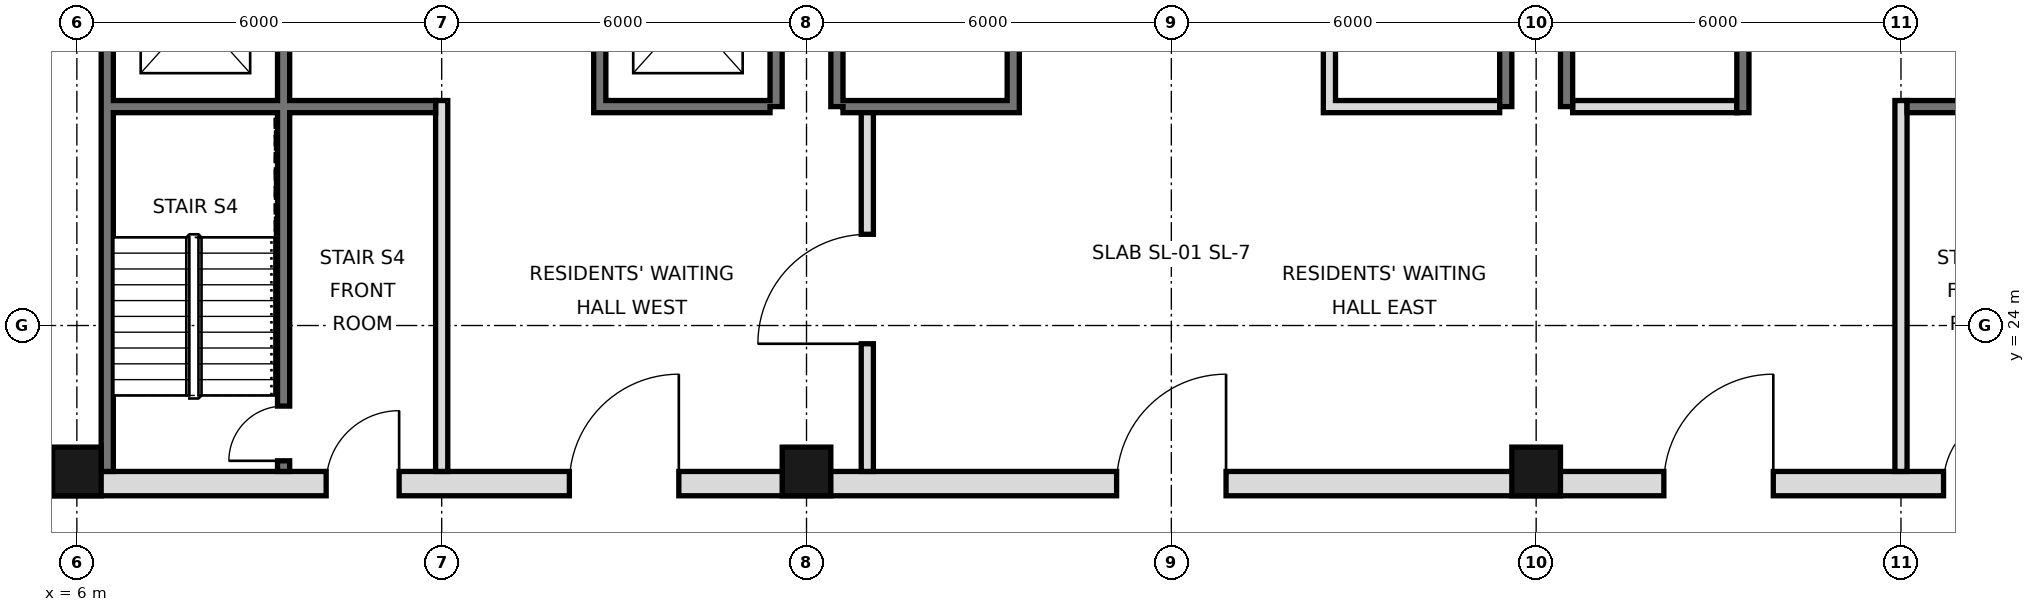
"""IFC4 building model, lengths in metres.
Left out: names, types, materials, properties, quantities, classifications, styles, units other than length and angle.
Written with IfcOpenShell. Run it as: python <this file> out.ifc"""

import sys

from ifc_helpers import new_model, si_unit, direction, frame, frame_2d, origin, origin_2d, place, context, subcontext, project, spatial, rectangle, hollow_rectangle, extrude, element, fill, save


model = new_model("IFC4")
c1 = context("Model", 3, precision=1e-05, world=origin(), true_north=direction((0.0, 1.0)))
c2 = subcontext(c1, "Body", "Model", "MODEL_VIEW")
j1 = project(units=[si_unit("LENGTHUNIT", "METRE"), si_unit("PLANEANGLEUNIT", "RADIAN")], contexts=[c1])
p1 = place(None, origin())
s1 = spatial("IfcSite", under=j1, at=p1, CompositionType="ELEMENT")
p2 = place(p1, origin())
s2 = spatial("IfcBuilding", under=s1, at=p2, CompositionType="ELEMENT")
p3 = place(p2, frame((0.0, 0.0, 143.8)))
s3 = spatial("IfcBuildingStorey", under=s2, at=p3, CompositionType="ELEMENT", Elevation=143.8)
for number, where, z_axis, x_axis in (
    (1, (6.0, 21.6, 0.0), (0.0, 0.0, 1.0), (1.0, 0.0, 0.0)),
    (2, (18.0, 21.6, 0.0), (0.0, 0.0, 1.0), (1.0, 0.0, 0.0)),
    (3, (30.0, 21.6, 0.0), (0.0, 0.0, 1.0), (1.0, 0.0, 0.0)),
):
    element("IfcColumn", number, at=place(p3, frame(where, z_axis=z_axis, x_axis=x_axis)), inside=s3, PredefinedType="COLUMN", context=c2, shape_type="SweptSolid", body=[
        extrude(hollow_rectangle(XDim=0.8, YDim=0.8, WallThickness=0.05, at=origin_2d()), origin(), (0.0, 0.0, 1.0), 3.6),
    ])
p4 = place(p3, frame((6.5, 21.6, 0.0), z_axis=(0.0, 0.0, 1.0), x_axis=(0.0, 1.0, 0.0)))
e4 = element("IfcWall", 4, at=p4, inside=s3, PredefinedType="SOLIDWALL", context=c2, shape_type="SweptSolid", body=[
    extrude(rectangle(XDim=23.5, YDim=0.2, at=frame_2d((11.75, 0.0))), origin(), (0.0, 0.0, 1.0), 3.42),
])
for number, where, z_axis, x_axis in (
    (5, (17.5, 27.6, 0.0), (0.0, 0.0, 1.0), (0.0, 1.0, 0.0)),
    (6, (18.5, 27.6, 0.0), (0.0, 0.0, 1.0), (0.0, 1.0, 0.0)),
    (7, (29.5, 27.6, 0.0), (0.0, 0.0, 1.0), (0.0, 1.0, 0.0)),
    (8, (30.5, 27.6, 0.0), (0.0, 0.0, 1.0), (0.0, 1.0, 0.0)),
):
    element("IfcWall", number, at=place(p3, frame(where, z_axis=z_axis, x_axis=x_axis)), inside=s3, PredefinedType="SOLIDWALL", context=c2, shape_type="SweptSolid", body=[
        extrude(rectangle(XDim=17.5, YDim=0.2, at=frame_2d((8.75, 0.0))), origin(), (0.0, 0.0, 1.0), 3.42),
    ])
p5 = place(p3, frame((5.6, 21.4, 0.0), z_axis=(0.0, 0.0, 1.0), x_axis=(1.0, 0.0, 0.0)))
e9 = element("IfcWall", 9, at=p5, inside=s3, PredefinedType="SOLIDWALL", context=c2, shape_type="SweptSolid", body=[
    extrude(rectangle(XDim=36.8, YDim=0.4, at=frame_2d((18.4, 0.0))), origin(), (0.0, 0.0, 1.0), 3.42),
])
p6 = place(p5, frame((8.5, 0.0, 0.0)))
e10 = element("IfcOpeningElement", 10, at=p6, cuts=e9, PredefinedType="OPENING", context=c2, shape_type="SweptSolid", body=[
    extrude(rectangle(XDim=1.8, YDim=2.1, at=frame_2d((0.9, 1.05))), frame((0.0, 0.21, 0.0), z_axis=(0.0, -1.0, 0.0), x_axis=(1.0, 0.0, 0.0)), (0.0, 0.0, 1.0), 0.42),
])
p7 = place(p5, frame((17.5, 0.0, 0.0)))
e11 = element("IfcOpeningElement", 11, at=p7, cuts=e9, PredefinedType="OPENING", context=c2, shape_type="SweptSolid", body=[
    extrude(rectangle(XDim=1.8, YDim=2.1, at=frame_2d((0.9, 1.05))), frame((0.0, 0.21, 0.0), z_axis=(0.0, -1.0, 0.0), x_axis=(1.0, 0.0, 0.0)), (0.0, 0.0, 1.0), 0.42),
])
p8 = place(p5, frame((26.5, 0.0, 0.0)))
e12 = element("IfcOpeningElement", 12, at=p8, cuts=e9, PredefinedType="OPENING", context=c2, shape_type="SweptSolid", body=[
    extrude(rectangle(XDim=1.8, YDim=2.1, at=frame_2d((0.9, 1.05))), frame((0.0, 0.21, 0.0), z_axis=(0.0, -1.0, 0.0), x_axis=(1.0, 0.0, 0.0)), (0.0, 0.0, 1.0), 0.42),
])
p9 = place(p5, frame((4.5, 0.0, 0.0)))
e13 = element("IfcOpeningElement", 13, at=p9, cuts=e9, PredefinedType="OPENING", context=c2, shape_type="SweptSolid", body=[
    extrude(rectangle(XDim=1.2, YDim=2.1, at=frame_2d((0.6, 1.05))), frame((0.0, 0.21, 0.0), z_axis=(0.0, -1.0, 0.0), x_axis=(1.0, 0.0, 0.0)), (0.0, 0.0, 1.0), 0.42),
])
p10 = place(p5, frame((31.1, 0.0, 0.0)))
e14 = element("IfcOpeningElement", 14, at=p10, cuts=e9, PredefinedType="OPENING", context=c2, shape_type="SweptSolid", body=[
    extrude(rectangle(XDim=1.2, YDim=2.1, at=frame_2d((0.6, 1.05))), frame((0.0, 0.21, 0.0), z_axis=(0.0, -1.0, 0.0), x_axis=(1.0, 0.0, 0.0)), (0.0, 0.0, 1.0), 0.42),
])
p11 = place(p3, frame((19.0, 21.6, 0.0), z_axis=(0.0, 0.0, 1.0), x_axis=(0.0, 1.0, 0.0)))
e15 = element("IfcWall", 15, at=p11, inside=s3, PredefinedType="PARTITIONING", context=c2, shape_type="SweptSolid", body=[
    extrude(rectangle(XDim=6.0, YDim=0.2, at=frame_2d((3.0, 0.0))), origin(), (0.0, 0.0, 1.0), 3.42),
])
p12 = place(p11, frame((2.1, 0.0, 0.0)))
e16 = element("IfcOpeningElement", 16, at=p12, cuts=e15, PredefinedType="OPENING", context=c2, shape_type="SweptSolid", body=[
    extrude(rectangle(XDim=1.8, YDim=2.1, at=frame_2d((0.9, 1.05))), frame((0.0, 0.11, 0.0), z_axis=(0.0, -1.0, 0.0), x_axis=(1.0, 0.0, 0.0)), (0.0, 0.0, 1.0), 0.22),
])
p13 = place(p3, frame((12.0, 21.6, 0.0), z_axis=(0.0, 0.0, 1.0), x_axis=(0.0, 1.0, 0.0)))
e17 = element("IfcWall", 17, at=p13, inside=s3, PredefinedType="PARTITIONING", context=c2, shape_type="SweptSolid", body=[
    extrude(rectangle(XDim=6.1, YDim=0.2, at=frame_2d((3.05, 0.0))), origin(), (0.0, 0.0, 1.0), 3.42),
])
p14 = place(p3, frame((14.6, 27.5, 0.0), z_axis=(0.0, 0.0, 1.0), x_axis=(0.0, 1.0, 0.0)))
e18 = element("IfcWall", 18, at=p14, inside=s3, PredefinedType="SOLIDWALL", context=c2, shape_type="SweptSolid", body=[
    extrude(rectangle(XDim=17.5, YDim=0.2, at=frame_2d((8.75, 0.0))), origin(), (0.0, 0.0, 1.0), 3.42),
])
p15 = place(p14, frame((1.1, 0.0, 0.0)))
e19 = element("IfcOpeningElement", 19, at=p15, cuts=e18, PredefinedType="OPENING", context=c2, shape_type="SweptSolid", body=[
    extrude(rectangle(XDim=1.1, YDim=2.1, at=frame_2d((0.55, 1.05))), frame((0.0, 0.11, 0.0), z_axis=(0.0, -1.0, 0.0), x_axis=(1.0, 0.0, 0.0)), (0.0, 0.0, 1.0), 0.22),
])
p16 = place(p14, frame((4.2, 0.0, 0.0)))
e20 = element("IfcOpeningElement", 20, at=p16, cuts=e18, PredefinedType="OPENING", context=c2, shape_type="SweptSolid", body=[
    extrude(rectangle(XDim=1.1, YDim=2.1, at=frame_2d((0.55, 1.05))), frame((0.0, 0.11, 0.0), z_axis=(0.0, -1.0, 0.0), x_axis=(1.0, 0.0, 0.0)), (0.0, 0.0, 1.0), 0.22),
])
p17 = place(p14, frame((15.4, 0.0, 0.0)))
e21 = element("IfcOpeningElement", 21, at=p17, cuts=e18, PredefinedType="OPENING", context=c2, shape_type="SweptSolid", body=[
    extrude(rectangle(XDim=1.1, YDim=2.1, at=frame_2d((0.55, 1.05))), frame((0.0, 0.11, 0.0), z_axis=(0.0, -1.0, 0.0), x_axis=(1.0, 0.0, 0.0)), (0.0, 0.0, 1.0), 0.22),
])
p18 = place(p14, frame((9.9, 0.0, 0.0)))
e22 = element("IfcOpeningElement", 22, at=p18, cuts=e18, PredefinedType="OPENING", context=c2, shape_type="SweptSolid", body=[
    extrude(rectangle(XDim=0.9, YDim=2.1, at=frame_2d((0.45, 1.05))), frame((0.0, 0.11, 0.0), z_axis=(0.0, -1.0, 0.0), x_axis=(1.0, 0.0, 0.0)), (0.0, 0.0, 1.0), 0.22),
])
p19 = place(p3, frame((21.4, 27.5, 0.0), z_axis=(0.0, 0.0, 1.0), x_axis=(0.0, 1.0, 0.0)))
e23 = element("IfcWall", 23, at=p19, inside=s3, PredefinedType="SOLIDWALL", context=c2, shape_type="SweptSolid", body=[
    extrude(rectangle(XDim=17.5, YDim=0.2, at=frame_2d((8.75, 0.0))), origin(), (0.0, 0.0, 1.0), 3.42),
])
p20 = place(p19, frame((9.8, 0.0, 0.0)))
e24 = element("IfcOpeningElement", 24, at=p20, cuts=e23, PredefinedType="OPENING", context=c2, shape_type="SweptSolid", body=[
    extrude(rectangle(XDim=1.0, YDim=2.1, at=frame_2d((0.5, 1.05))), frame((0.0, 0.11, 0.0), z_axis=(0.0, -1.0, 0.0), x_axis=(1.0, 0.0, 0.0)), (0.0, 0.0, 1.0), 0.22),
])
p21 = place(p19, frame((7.4, 0.0, 0.0)))
e25 = element("IfcOpeningElement", 25, at=p21, cuts=e23, PredefinedType="OPENING", context=c2, shape_type="SweptSolid", body=[
    extrude(rectangle(XDim=0.9, YDim=2.1, at=frame_2d((0.45, 1.05))), frame((0.0, 0.11, 0.0), z_axis=(0.0, -1.0, 0.0), x_axis=(1.0, 0.0, 0.0)), (0.0, 0.0, 1.0), 0.22),
])
p22 = place(p3, frame((26.6, 27.5, 0.0), z_axis=(0.0, 0.0, 1.0), x_axis=(0.0, 1.0, 0.0)))
e26 = element("IfcWall", 26, at=p22, inside=s3, PredefinedType="SOLIDWALL", context=c2, shape_type="SweptSolid", body=[
    extrude(rectangle(XDim=17.5, YDim=0.2, at=frame_2d((8.75, 0.0))), origin(), (0.0, 0.0, 1.0), 3.42),
])
p23 = place(p22, frame((4.3, 0.0, 0.0)))
e27 = element("IfcOpeningElement", 27, at=p23, cuts=e26, PredefinedType="OPENING", context=c2, shape_type="SweptSolid", body=[
    extrude(rectangle(XDim=0.9, YDim=2.1, at=frame_2d((0.45, 1.05))), frame((0.0, 0.11, 0.0), z_axis=(0.0, -1.0, 0.0), x_axis=(1.0, 0.0, 0.0)), (0.0, 0.0, 1.0), 0.22),
])
p24 = place(p22, frame((10.35, 0.0, 0.0)))
e28 = element("IfcOpeningElement", 28, at=p24, cuts=e26, PredefinedType="OPENING", context=c2, shape_type="SweptSolid", body=[
    extrude(rectangle(XDim=1.0, YDim=2.1, at=frame_2d((0.5, 1.05))), frame((0.0, 0.11, 0.0), z_axis=(0.0, -1.0, 0.0), x_axis=(1.0, 0.0, 0.0)), (0.0, 0.0, 1.0), 0.22),
])
p25 = place(p3, frame((33.4, 27.5, 0.0), z_axis=(0.0, 0.0, 1.0), x_axis=(0.0, 1.0, 0.0)))
e29 = element("IfcWall", 29, at=p25, inside=s3, PredefinedType="SOLIDWALL", context=c2, shape_type="SweptSolid", body=[
    extrude(rectangle(XDim=17.5, YDim=0.2, at=frame_2d((8.75, 0.0))), origin(), (0.0, 0.0, 1.0), 3.42),
])
p26 = place(p25, frame((15.4, 0.0, 0.0)))
e30 = element("IfcOpeningElement", 30, at=p26, cuts=e29, PredefinedType="OPENING", context=c2, shape_type="SweptSolid", body=[
    extrude(rectangle(XDim=1.1, YDim=2.1, at=frame_2d((0.55, 1.05))), frame((0.0, 0.11, 0.0), z_axis=(0.0, -1.0, 0.0), x_axis=(1.0, 0.0, 0.0)), (0.0, 0.0, 1.0), 0.22),
])
p27 = place(p25, frame((2.7, 0.0, 0.0)))
e31 = element("IfcOpeningElement", 31, at=p27, cuts=e29, PredefinedType="OPENING", context=c2, shape_type="SweptSolid", body=[
    extrude(rectangle(XDim=1.0, YDim=2.1, at=frame_2d((0.5, 1.05))), frame((0.0, 0.11, 0.0), z_axis=(0.0, -1.0, 0.0), x_axis=(1.0, 0.0, 0.0)), (0.0, 0.0, 1.0), 0.22),
])
p28 = place(p25, frame((9.9, 0.0, 0.0)))
e32 = element("IfcOpeningElement", 32, at=p28, cuts=e29, PredefinedType="OPENING", context=c2, shape_type="SweptSolid", body=[
    extrude(rectangle(XDim=0.9, YDim=2.1, at=frame_2d((0.45, 1.05))), frame((0.0, 0.11, 0.0), z_axis=(0.0, -1.0, 0.0), x_axis=(1.0, 0.0, 0.0)), (0.0, 0.0, 1.0), 0.22),
])
p29 = place(p3, frame((36.0, 21.6, 0.0), z_axis=(0.0, 0.0, 1.0), x_axis=(0.0, 1.0, 0.0)))
e33 = element("IfcWall", 33, at=p29, inside=s3, PredefinedType="PARTITIONING", context=c2, shape_type="SweptSolid", body=[
    extrude(rectangle(XDim=6.1, YDim=0.2, at=frame_2d((3.05, 0.0))), origin(), (0.0, 0.0, 1.0), 3.42),
])
p30 = place(p3, frame((9.4, 21.6, 0.0), z_axis=(0.0, 0.0, 1.0), x_axis=(0.0, 1.0, 0.0)))
e34 = element("IfcWall", 34, at=p30, inside=s3, PredefinedType="SOLIDWALL", context=c2, shape_type="SweptSolid", body=[
    extrude(rectangle(XDim=23.4, YDim=0.2, at=frame_2d((11.7, 0.0))), origin(), (0.0, 0.0, 1.0), 3.42),
])
p31 = place(p30, frame((7.0, 0.0, 0.0)))
e35 = element("IfcOpeningElement", 35, at=p31, cuts=e34, PredefinedType="OPENING", context=c2, shape_type="SweptSolid", body=[
    extrude(rectangle(XDim=1.1, YDim=2.1, at=frame_2d((0.55, 1.05))), frame((0.0, 0.11, 0.0), z_axis=(0.0, -1.0, 0.0), x_axis=(1.0, 0.0, 0.0)), (0.0, 0.0, 1.0), 0.22),
])
p32 = place(p30, frame((10.1, 0.0, 0.0)))
e36 = element("IfcOpeningElement", 36, at=p32, cuts=e34, PredefinedType="OPENING", context=c2, shape_type="SweptSolid", body=[
    extrude(rectangle(XDim=1.1, YDim=2.1, at=frame_2d((0.55, 1.05))), frame((0.0, 0.11, 0.0), z_axis=(0.0, -1.0, 0.0), x_axis=(1.0, 0.0, 0.0)), (0.0, 0.0, 1.0), 0.22),
])
p33 = place(p30, frame((13.2, 0.0, 0.0)))
e37 = element("IfcOpeningElement", 37, at=p33, cuts=e34, PredefinedType="OPENING", context=c2, shape_type="SweptSolid", body=[
    extrude(rectangle(XDim=1.1, YDim=2.1, at=frame_2d((0.55, 1.05))), frame((0.0, 0.11, 0.0), z_axis=(0.0, -1.0, 0.0), x_axis=(1.0, 0.0, 0.0)), (0.0, 0.0, 1.0), 0.22),
])
p34 = place(p30, frame((15.7, 0.0, 0.0)))
e38 = element("IfcOpeningElement", 38, at=p34, cuts=e34, PredefinedType="OPENING", context=c2, shape_type="SweptSolid", body=[
    extrude(rectangle(XDim=1.0, YDim=2.1, at=frame_2d((0.5, 1.05))), frame((0.0, 0.11, 0.0), z_axis=(0.0, -1.0, 0.0), x_axis=(1.0, 0.0, 0.0)), (0.0, 0.0, 1.0), 0.22),
])
p35 = place(p30, frame((0.175, 0.0, 0.0)))
e39 = element("IfcOpeningElement", 39, at=p35, cuts=e34, PredefinedType="OPENING", context=c2, shape_type="SweptSolid", body=[
    extrude(rectangle(XDim=0.9, YDim=2.1, at=frame_2d((0.45, 1.05))), frame((0.0, 0.11, 0.0), z_axis=(0.0, -1.0, 0.0), x_axis=(1.0, 0.0, 0.0)), (0.0, 0.0, 1.0), 0.22),
])
for number, where, z_axis, x_axis in (
    (40, (14.7, 27.6, 0.0), (0.0, 0.0, 1.0), (1.0, 0.0, 0.0)),
    (41, (18.6, 27.6, 0.0), (0.0, 0.0, 1.0), (1.0, 0.0, 0.0)),
    (42, (26.7, 27.6, 0.0), (0.0, 0.0, 1.0), (1.0, 0.0, 0.0)),
):
    element("IfcWall", number, at=place(p3, frame(where, z_axis=z_axis, x_axis=x_axis)), inside=s3, PredefinedType="SOLIDWALL", context=c2, shape_type="SweptSolid", body=[
        extrude(rectangle(XDim=2.7, YDim=0.2, at=frame_2d((1.35, 0.0))), origin(), (0.0, 0.0, 1.0), 3.42),
    ])
p36 = place(p3, frame((30.6, 27.6, 0.0), z_axis=(0.0, 0.0, 1.0), x_axis=(1.0, 0.0, 0.0)))
e43 = element("IfcWall", 43, at=p36, inside=s3, PredefinedType="PARTITIONING", context=c2, shape_type="SweptSolid", body=[
    extrude(rectangle(XDim=2.7, YDim=0.2, at=frame_2d((1.35, 0.0))), origin(), (0.0, 0.0, 1.0), 3.42),
])
for number, where, z_axis, x_axis in (
    (44, (36.1, 27.6, 0.0), (0.0, 0.0, 1.0), (1.0, 0.0, 0.0)),
    (45, (6.6, 27.6, 0.0), (0.0, 0.0, 1.0), (1.0, 0.0, 0.0)),
):
    element("IfcWall", number, at=place(p3, frame(where, z_axis=z_axis, x_axis=x_axis)), inside=s3, PredefinedType="SOLIDWALL", context=c2, shape_type="SweptSolid", body=[
        extrude(rectangle(XDim=5.3, YDim=0.2, at=frame_2d((2.65, 0.0))), origin(), (0.0, 0.0, 1.0), 3.42),
    ])
p37 = place(p6, frame((1.8, 0.0, 0.0), z_axis=(0.0, 0.0, 1.0), x_axis=(-1.0, 0.0, 0.0)))
e46 = element("IfcDoor", 46, at=p37, inside=s3, OperationType="SINGLE_SWING_LEFT", PredefinedType="DOOR", context=c2, shape_type="SweptSolid", body=[
    extrude(rectangle(XDim=1.8, YDim=2.1, at=frame_2d((0.9, 1.05))), frame((0.0, 0.025, 0.0), z_axis=(0.0, -1.0, 0.0), x_axis=(1.0, 0.0, 0.0)), (0.0, 0.0, 1.0), 0.05),
])
fill(e10, e46)
p38 = place(p12, origin())
e47 = element("IfcDoor", 47, at=p38, inside=s3, OperationType="SINGLE_SWING_LEFT", PredefinedType="DOOR", context=c2, shape_type="SweptSolid", body=[
    extrude(rectangle(XDim=1.8, YDim=2.1, at=frame_2d((0.9, 1.05))), frame((0.0, 0.025, 0.0), z_axis=(0.0, -1.0, 0.0), x_axis=(1.0, 0.0, 0.0)), (0.0, 0.0, 1.0), 0.05),
])
fill(e16, e47)
p39 = place(p7, frame((1.8, 0.0, 0.0), z_axis=(0.0, 0.0, 1.0), x_axis=(-1.0, 0.0, 0.0)))
e48 = element("IfcDoor", 48, at=p39, inside=s3, OperationType="SINGLE_SWING_LEFT", PredefinedType="DOOR", context=c2, shape_type="SweptSolid", body=[
    extrude(rectangle(XDim=1.8, YDim=2.1, at=frame_2d((0.9, 1.05))), frame((0.0, 0.025, 0.0), z_axis=(0.0, -1.0, 0.0), x_axis=(1.0, 0.0, 0.0)), (0.0, 0.0, 1.0), 0.05),
])
fill(e11, e48)
p40 = place(p8, frame((1.8, 0.0, 0.0), z_axis=(0.0, 0.0, 1.0), x_axis=(-1.0, 0.0, 0.0)))
e49 = element("IfcDoor", 49, at=p40, inside=s3, OperationType="SINGLE_SWING_LEFT", PredefinedType="DOOR", context=c2, shape_type="SweptSolid", body=[
    extrude(rectangle(XDim=1.8, YDim=2.1, at=frame_2d((0.9, 1.05))), frame((0.0, 0.025, 0.0), z_axis=(0.0, -1.0, 0.0), x_axis=(1.0, 0.0, 0.0)), (0.0, 0.0, 1.0), 0.05),
])
fill(e12, e49)
p41 = place(p9, frame((1.2, 0.0, 0.0), z_axis=(0.0, 0.0, 1.0), x_axis=(-1.0, 0.0, 0.0)))
e50 = element("IfcDoor", 50, at=p41, inside=s3, OperationType="SINGLE_SWING_LEFT", PredefinedType="DOOR", context=c2, shape_type="SweptSolid", body=[
    extrude(rectangle(XDim=1.2, YDim=2.1, at=frame_2d((0.6, 1.05))), frame((0.0, 0.025, 0.0), z_axis=(0.0, -1.0, 0.0), x_axis=(1.0, 0.0, 0.0)), (0.0, 0.0, 1.0), 0.05),
])
fill(e13, e50)
p42 = place(p10, frame((1.2, 0.0, 0.0), z_axis=(0.0, 0.0, 1.0), x_axis=(-1.0, 0.0, 0.0)))
e51 = element("IfcDoor", 51, at=p42, inside=s3, OperationType="SINGLE_SWING_LEFT", PredefinedType="DOOR", context=c2, shape_type="SweptSolid", body=[
    extrude(rectangle(XDim=1.2, YDim=2.1, at=frame_2d((0.6, 1.05))), frame((0.0, 0.025, 0.0), z_axis=(0.0, -1.0, 0.0), x_axis=(1.0, 0.0, 0.0)), (0.0, 0.0, 1.0), 0.05),
])
fill(e14, e51)
p43 = place(p35, origin())
e52 = element("IfcDoor", 52, at=p43, inside=s3, OperationType="SINGLE_SWING_LEFT", PredefinedType="DOOR", context=c2, shape_type="SweptSolid", body=[
    extrude(rectangle(XDim=0.9, YDim=2.1, at=frame_2d((0.45, 1.05))), frame((0.0, 0.025, 0.0), z_axis=(0.0, -1.0, 0.0), x_axis=(1.0, 0.0, 0.0)), (0.0, 0.0, 1.0), 0.05),
])
fill(e39, e52)
save(model, sys.argv[1])
